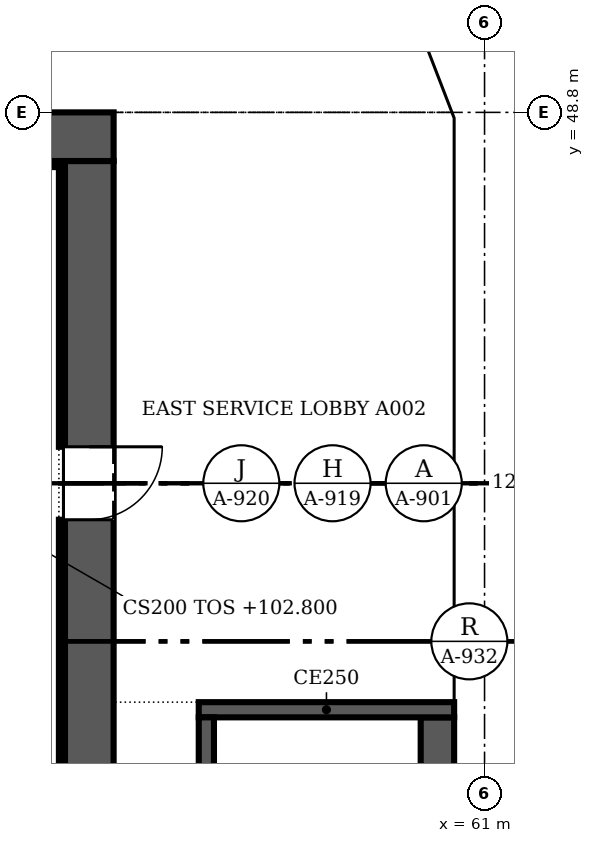
"""IFC4 building model, lengths in metres.
Left out: names, types, materials, properties, quantities, classifications, styles, units other than length and angle.
Written with IfcOpenShell. Run it as: python <this file> out.ifc"""

import sys

from ifc_helpers import new_model, si_unit, direction, frame, frame_2d, origin, place, context, subcontext, project, spatial, polyline, rectangle, outline, extrude, faceted_brep, source, transform, mapped, element, fill, save


model = new_model("IFC4")
c1 = context("Model", 3, precision=1e-05, world=origin(), true_north=direction((0.0, 1.0)))
c2 = subcontext(c1, "Body", "Model", "MODEL_VIEW")
j1 = project(units=[si_unit("LENGTHUNIT", "METRE"), si_unit("PLANEANGLEUNIT", "RADIAN")], contexts=[c1])
p1 = place(None, origin())
s1 = spatial("IfcSite", under=j1, at=p1, CompositionType="ELEMENT")
p2 = place(p1, origin())
s2 = spatial("IfcBuilding", under=s1, at=p2, CompositionType="ELEMENT")
p3 = place(p2, frame((0.0, 0.0, 102.8)))
s3 = spatial("IfcBuildingStorey", under=s2, at=p3, CompositionType="ELEMENT", Elevation=102.8)
m1 = source(origin(), c2, "Body", "Brep", [
    faceted_brep([(3.05, -0.25, 0.0), (6.1, -0.25, 3.8), (6.1, -0.25, 3.8), (3.05, -0.25, 7.6), (0.0, -0.25, 3.8), (0.0, 0.25, 3.8), (3.05, 0.25, 7.6), (6.1, 0.25, 3.8), (6.1, 0.25, 3.8), (3.05, 0.25, 0.0)], [[[0, 1, 2, 3, 4]], [[5, 6, 7, 8, 9]], [[9, 8, 1, 0]], [[7, 6, 3, 2]], [[6, 5, 4, 3]], [[5, 9, 0, 4]], [[1, 8, 7, 2]]]),
])
p4 = place(p3, frame((60.75, 33.55, -3.8), z_axis=(0.0, 0.0, 1.0), x_axis=(0.0, 1.0, 0.0)))
e1 = element("IfcWall", 1, at=p4, inside=s3, PredefinedType="SOLIDWALL", context=c2, shape_type="MappedRepresentation", body=[
    mapped(m1, transform((0.0, 0.0, 0.0), scale=1.0)),
])
m2 = source(origin(), c2, "Body", "SweptSolid", [
    extrude(outline(polyline([(3.05, 0.399), (5.78, 3.8), (3.05, 7.201), (0.321, 3.8), (3.05, 0.399)])), frame((0.0, 0.26, 0.0), z_axis=(0.0, -1.0, 0.0), x_axis=(1.0, 0.0, 0.0)), (0.0, 0.0, 1.0), 0.52),
])
p5 = place(p4, origin())
e2 = element("IfcOpeningElement", 2, at=p5, cuts=e1, PredefinedType="OPENING", context=c2, shape_type="MappedRepresentation", body=[
    mapped(m2, transform((0.0, 0.0, 0.0), scale=1.0)),
])
m3 = source(origin(), c2, "Body", "SweptSolid", [
    extrude(outline(polyline([(3.05, 0.0), (6.1, 3.8), (3.05, 7.6), (0.0, 3.8), (3.05, 0.0)])), frame((0.0, 0.25, 0.0), z_axis=(0.0, -1.0, 0.0), x_axis=(1.0, 0.0, 0.0)), (0.0, 0.0, 1.0), 0.5),
])
p6 = place(p3, frame((60.75, 39.65, -3.8), z_axis=(0.0, 0.0, 1.0), x_axis=(0.0, 1.0, 0.0)))
e3 = element("IfcWall", 3, at=p6, inside=s3, PredefinedType="SOLIDWALL", context=c2, shape_type="MappedRepresentation", body=[
    mapped(m3, transform((0.0, 0.0, 0.0), scale=1.0)),
])
p7 = place(p6, origin())
e4 = element("IfcOpeningElement", 4, at=p7, cuts=e3, PredefinedType="OPENING", context=c2, shape_type="MappedRepresentation", body=[
    mapped(m2, transform((0.0, 0.0, 0.0), scale=1.0)),
])
m4 = source(origin(), c2, "Body", "Brep", [
    faceted_brep([(3.003, -0.25, 0.0), (3.05, -0.25, 0.06), (3.05, -0.25, 7.54), (3.003, -0.25, 7.6), (0.0, -0.25, 3.8), (0.0, 0.25, 3.8), (2.957, 0.25, 7.541), (2.957, 0.25, 0.059), (3.003, 0.0, 0.0), (3.003, 0.0, 7.6)], [[[0, 1, 2, 3, 4]], [[5, 6, 7]], [[1, 0, 8]], [[9, 3, 2]], [[6, 5, 4, 3, 9]], [[5, 7, 8, 0, 4]], [[1, 8, 7, 6, 9, 2]]]),
])
p8 = place(p3, frame((60.75, 45.75, -3.8), z_axis=(0.0, 0.0, 1.0), x_axis=(0.0, 1.0, 0.0)))
e5 = element("IfcWall", 5, at=p8, inside=s3, PredefinedType="SOLIDWALL", context=c2, shape_type="MappedRepresentation", body=[
    mapped(m4, transform((0.0, 0.0, 0.0), scale=1.0)),
])
m5 = source(origin(), c2, "Body", "SweptSolid", [
    extrude(outline(polyline([(2.803, 6.944), (0.319, 3.8), (2.803, 0.656), (2.803, 6.944)])), frame((0.0, 0.26, 0.0), z_axis=(0.0, -1.0, 0.0), x_axis=(1.0, 0.0, 0.0)), (0.0, 0.0, 1.0), 0.52),
])
p9 = place(p8, origin())
e6 = element("IfcOpeningElement", 6, at=p9, cuts=e5, PredefinedType="OPENING", context=c2, shape_type="MappedRepresentation", body=[
    mapped(m5, transform((0.0, 0.0, 0.0), scale=1.0)),
])
m6 = source(origin(), c2, "Body", "Brep", [
    faceted_brep([(0.047, -0.25, 0.0), (2.997, -0.25, 3.8), (0.047, -0.25, 7.6), (0.0, -0.25, 7.541), (0.0, -0.25, 0.059), (0.093, 0.25, 7.54), (2.944, 0.25, 3.868), (2.944, 0.25, 3.732), (0.093, 0.25, 0.06), (2.997, 0.0, 3.8), (0.047, 0.0, 0.0), (0.047, 0.0, 7.6)], [[[0, 1, 2, 3, 4]], [[5, 6, 7, 8]], [[8, 7, 9, 1, 0, 10]], [[6, 5, 11, 2, 1, 9]], [[3, 2, 11]], [[10, 0, 4]], [[8, 10, 4, 3, 11, 5]], [[9, 7, 6]]]),
])
p10 = place(p3, frame((60.767, 48.71, -3.8), z_axis=(0.0, 0.0, 1.0), x_axis=(-0.359901446078, 0.932990326376, 0.0)))
e7 = element("IfcWall", 7, at=p10, inside=s3, PredefinedType="SOLIDWALL", context=c2, shape_type="MappedRepresentation", body=[
    mapped(m6, transform((0.0, 0.0, 0.0), scale=1.0)),
])
m7 = source(origin(), c2, "Body", "SweptSolid", [
    extrude(outline(polyline([(0.247, 0.665), (2.681, 3.8), (0.247, 6.935), (0.247, 0.665)])), frame((0.0, 0.26, 0.0), z_axis=(0.0, -1.0, 0.0), x_axis=(1.0, 0.0, 0.0)), (0.0, 0.0, 1.0), 0.52),
])
p11 = place(p10, origin())
e8 = element("IfcOpeningElement", 8, at=p11, cuts=e7, PredefinedType="OPENING", context=c2, shape_type="MappedRepresentation", body=[
    mapped(m7, transform((0.0, 0.0, 0.0), scale=1.0)),
])
m8 = source(origin(), c2, "Body", "Brep", [
    faceted_brep([(3.05, -0.25, 0.0), (6.1, -0.25, 3.8), (6.1, -0.25, 3.8), (0.0, -0.25, 3.8), (0.0, 0.25, 3.8), (6.1, 0.25, 3.8), (6.1, 0.25, 3.8), (3.05, 0.25, 0.0)], [[[0, 1, 2, 3]], [[4, 5, 6, 7]], [[7, 6, 1, 0]], [[5, 4, 3, 2]], [[4, 7, 0, 3]], [[1, 6, 5, 2]]]),
])
p12 = place(p3, frame((60.75, 36.6, 0.0), z_axis=(0.0, 0.0, 1.0), x_axis=(0.0, 1.0, 0.0)))
e9 = element("IfcWall", 9, at=p12, inside=s3, PredefinedType="SOLIDWALL", context=c2, shape_type="MappedRepresentation", body=[
    mapped(m8, transform((0.0, 0.0, 0.0), scale=1.0)),
])
m9 = source(origin(), c2, "Body", "SweptSolid", [
    extrude(outline(polyline([(3.05, 0.399), (5.579, 3.55), (0.521, 3.55), (3.05, 0.399)])), frame((0.0, 0.26, 0.0), z_axis=(0.0, -1.0, 0.0), x_axis=(1.0, 0.0, 0.0)), (0.0, 0.0, 1.0), 0.52),
])
p13 = place(p12, origin())
e10 = element("IfcOpeningElement", 10, at=p13, cuts=e9, PredefinedType="OPENING", context=c2, shape_type="MappedRepresentation", body=[
    mapped(m9, transform((0.0, 0.0, 0.0), scale=1.0)),
])
m10 = source(origin(), c2, "Body", "Brep", [
    faceted_brep([(3.05, -0.25, 0.0), (6.053, -0.25, 3.8), (0.0, -0.25, 3.8), (0.0, 0.25, 3.8), (6.007, 0.25, 3.8), (6.007, 0.25, 3.741), (3.05, 0.25, 0.0), (6.053, 0.0, 3.8)], [[[0, 1, 2]], [[3, 4, 5, 6]], [[6, 5, 7, 1, 0]], [[4, 3, 2, 1, 7]], [[3, 6, 0, 2]], [[5, 4, 7]]]),
])
p14 = place(p3, frame((60.75, 42.7, 0.0), z_axis=(0.0, 0.0, 1.0), x_axis=(0.0, 1.0, 0.0)))
e11 = element("IfcWall", 11, at=p14, inside=s3, PredefinedType="SOLIDWALL", context=c2, shape_type="MappedRepresentation", body=[
    mapped(m10, transform((0.0, 0.0, 0.0), scale=1.0)),
])
m11 = source(origin(), c2, "Body", "SweptSolid", [
    extrude(outline(polyline([(3.049, 0.401), (5.537, 3.55), (0.521, 3.55), (3.049, 0.401)])), frame((0.0, 0.26, 0.0), z_axis=(0.0, -1.0, 0.0), x_axis=(1.0, 0.0, 0.0)), (0.0, 0.0, 1.0), 0.52),
])
p15 = place(p14, origin())
e12 = element("IfcOpeningElement", 12, at=p15, cuts=e11, PredefinedType="OPENING", context=c2, shape_type="MappedRepresentation", body=[
    mapped(m11, transform((0.0, 0.0, 0.0), scale=1.0)),
])
m12 = source(origin(), c2, "Body", "Brep", [
    faceted_brep([(2.95, -0.25, 0.0), (3.003, -0.25, 0.068), (3.003, -0.25, 3.8), (0.0, -0.25, 3.8), (0.047, 0.25, 3.8), (2.898, 0.25, 3.8), (2.898, 0.25, 0.068), (0.047, 0.25, 3.74), (2.95, 0.0, 0.0), (0.0, 0.0, 3.8)], [[[0, 1, 2, 3]], [[4, 5, 6, 7]], [[1, 0, 8]], [[5, 4, 9, 3, 2]], [[7, 6, 8, 0, 3, 9]], [[7, 9, 4]], [[1, 8, 6, 5, 2]]]),
])
p16 = place(p3, frame((60.75, 48.753, 0.0), z_axis=(0.0, 0.0, 1.0), x_axis=(-0.35992665181, 0.932980602862, 0.0)))
e13 = element("IfcWall", 13, at=p16, inside=s3, PredefinedType="SOLIDWALL", context=c2, shape_type="MappedRepresentation", body=[
    mapped(m12, transform((0.0, 0.0, 0.0), scale=1.0)),
])
m13 = source(origin(), c2, "Body", "SweptSolid", [
    extrude(outline(polyline([(2.75, 3.55), (0.511, 3.55), (2.75, 0.665), (2.75, 3.55)])), frame((0.0, 0.26, 0.0), z_axis=(0.0, -1.0, 0.0), x_axis=(1.0, 0.0, 0.0)), (0.0, 0.0, 1.0), 0.52),
])
p17 = place(p16, origin())
e14 = element("IfcOpeningElement", 14, at=p17, cuts=e13, PredefinedType="OPENING", context=c2, shape_type="MappedRepresentation", body=[
    mapped(m13, transform((0.0, 0.0, 0.0), scale=1.0)),
])
p18 = place(p3, frame((30.5, 48.4, 0.0), z_axis=(0.0, 0.0, 1.0), x_axis=(1.0, 0.0, 0.0)))
e15 = element("IfcWall", 15, at=p18, inside=s3, PredefinedType="SHEAR", context=c2, shape_type="SweptSolid", body=[
    extrude(rectangle(XDim=24.4, YDim=0.8, at=frame_2d((12.2, 0.0))), origin(), (0.0, 0.0, 1.0), 3.8),
])
p19 = place(p3, frame((54.5, 48.0, 0.0), z_axis=(0.0, 0.0, 1.0), x_axis=(0.0, -1.0, 0.0)))
e16 = element("IfcWall", 16, at=p19, inside=s3, PredefinedType="SHEAR", context=c2, shape_type="SweptSolid", body=[
    extrude(rectangle(XDim=22.8, YDim=0.8, at=frame_2d((11.4, 0.0))), origin(), (0.0, 0.0, 1.0), 3.8),
])
m14 = source(origin(), c2, "Body", "SweptSolid", [
    extrude(rectangle(XDim=1.2, YDim=2.1, at=frame_2d((0.6, 1.05))), frame((0.0, 0.41, 0.0), z_axis=(0.0, -1.0, 0.0), x_axis=(1.0, 0.0, 0.0)), (0.0, 0.0, 1.0), 0.82),
])
p20 = place(p19, frame((4.7, 0.0, 0.0)))
e17 = element("IfcOpeningElement", 17, at=p20, cuts=e16, PredefinedType="OPENING", context=c2, shape_type="MappedRepresentation", body=[
    mapped(m14, transform((0.0, 0.0, 0.0), scale=1.0)),
])
p21 = place(p3, frame((31.3, 47.95, 0.0), z_axis=(0.0, 0.0, 1.0), x_axis=(1.0, 0.0, 0.0)))
e18 = element("IfcWall", 18, at=p21, inside=s3, PredefinedType="SOLIDWALL", context=c2, shape_type="SweptSolid", body=[
    extrude(rectangle(XDim=22.8, YDim=0.1, at=frame_2d((11.4, 0.0))), origin(), (0.0, 0.0, 1.0), 3.8),
])
p22 = place(p3, frame((54.05, 36.88, 0.0), z_axis=(0.0, 0.0, 1.0), x_axis=(0.0, 1.0, 0.0)))
e19 = element("IfcWall", 19, at=p22, inside=s3, PredefinedType="SOLIDWALL", context=c2, shape_type="SweptSolid", body=[
    extrude(rectangle(XDim=5.22, YDim=0.1, at=frame_2d((2.61, 0.0))), origin(), (0.0, 0.0, 1.0), 3.8),
])
p23 = place(p3, frame((54.05, 43.3, 0.0), z_axis=(0.0, 0.0, 1.0), x_axis=(0.0, 1.0, 0.0)))
e20 = element("IfcWall", 20, at=p23, inside=s3, PredefinedType="SOLIDWALL", context=c2, shape_type="SweptSolid", body=[
    extrude(rectangle(XDim=4.6, YDim=0.1, at=frame_2d((2.3, 0.0))), origin(), (0.0, 0.0, 1.0), 3.8),
])
p24 = place(p3, frame((56.425, 30.85, 0.0), z_axis=(0.0, 0.0, 1.0), x_axis=(0.0, 1.0, 0.0)))
e21 = element("IfcWall", 21, at=p24, inside=s3, PredefinedType="SOLIDWALL", context=c2, shape_type="SweptSolid", body=[
    extrude(rectangle(XDim=8.0, YDim=0.25, at=frame_2d((4.0, 0.0))), origin(), (0.0, 0.0, 1.0), 3.8),
])
p25 = place(p3, frame((56.3, 38.975, 0.0), z_axis=(0.0, 0.0, 1.0), x_axis=(1.0, 0.0, 0.0)))
e22 = element("IfcWall", 22, at=p25, inside=s3, PredefinedType="SOLIDWALL", context=c2, shape_type="SweptSolid", body=[
    extrude(rectangle(XDim=4.2, YDim=0.25, at=frame_2d((2.1, 0.0))), origin(), (0.0, 0.0, 1.0), 3.8),
])
p26 = place(p3, frame((60.225, 38.85, 0.0), z_axis=(0.0, 0.0, 1.0), x_axis=(0.0, -1.0, 0.0)))
e23 = element("IfcWall", 23, at=p26, inside=s3, PredefinedType="SOLIDWALL", context=c2, shape_type="SweptSolid", body=[
    extrude(rectangle(XDim=8.0, YDim=0.55, at=frame_2d((4.0, 0.0))), origin(), (0.0, 0.0, 1.0), 3.8),
])
m15 = source(origin(), c2, "Body", "SweptSolid", [
    extrude(rectangle(XDim=1.2, YDim=2.1, at=frame_2d((0.6, 1.05))), frame((0.0, 0.025, 0.0), z_axis=(0.0, -1.0, 0.0), x_axis=(1.0, 0.0, 0.0)), (0.0, 0.0, 1.0), 0.05),
])
p27 = place(p20, origin())
e24 = element("IfcDoor", 24, at=p27, inside=s3, OperationType="SINGLE_SWING_LEFT", PredefinedType="DOOR", context=c2, shape_type="MappedRepresentation", body=[
    mapped(m15, transform((0.0, 0.0, 0.0), scale=1.0)),
])
fill(e17, e24)
save(model, sys.argv[1])
